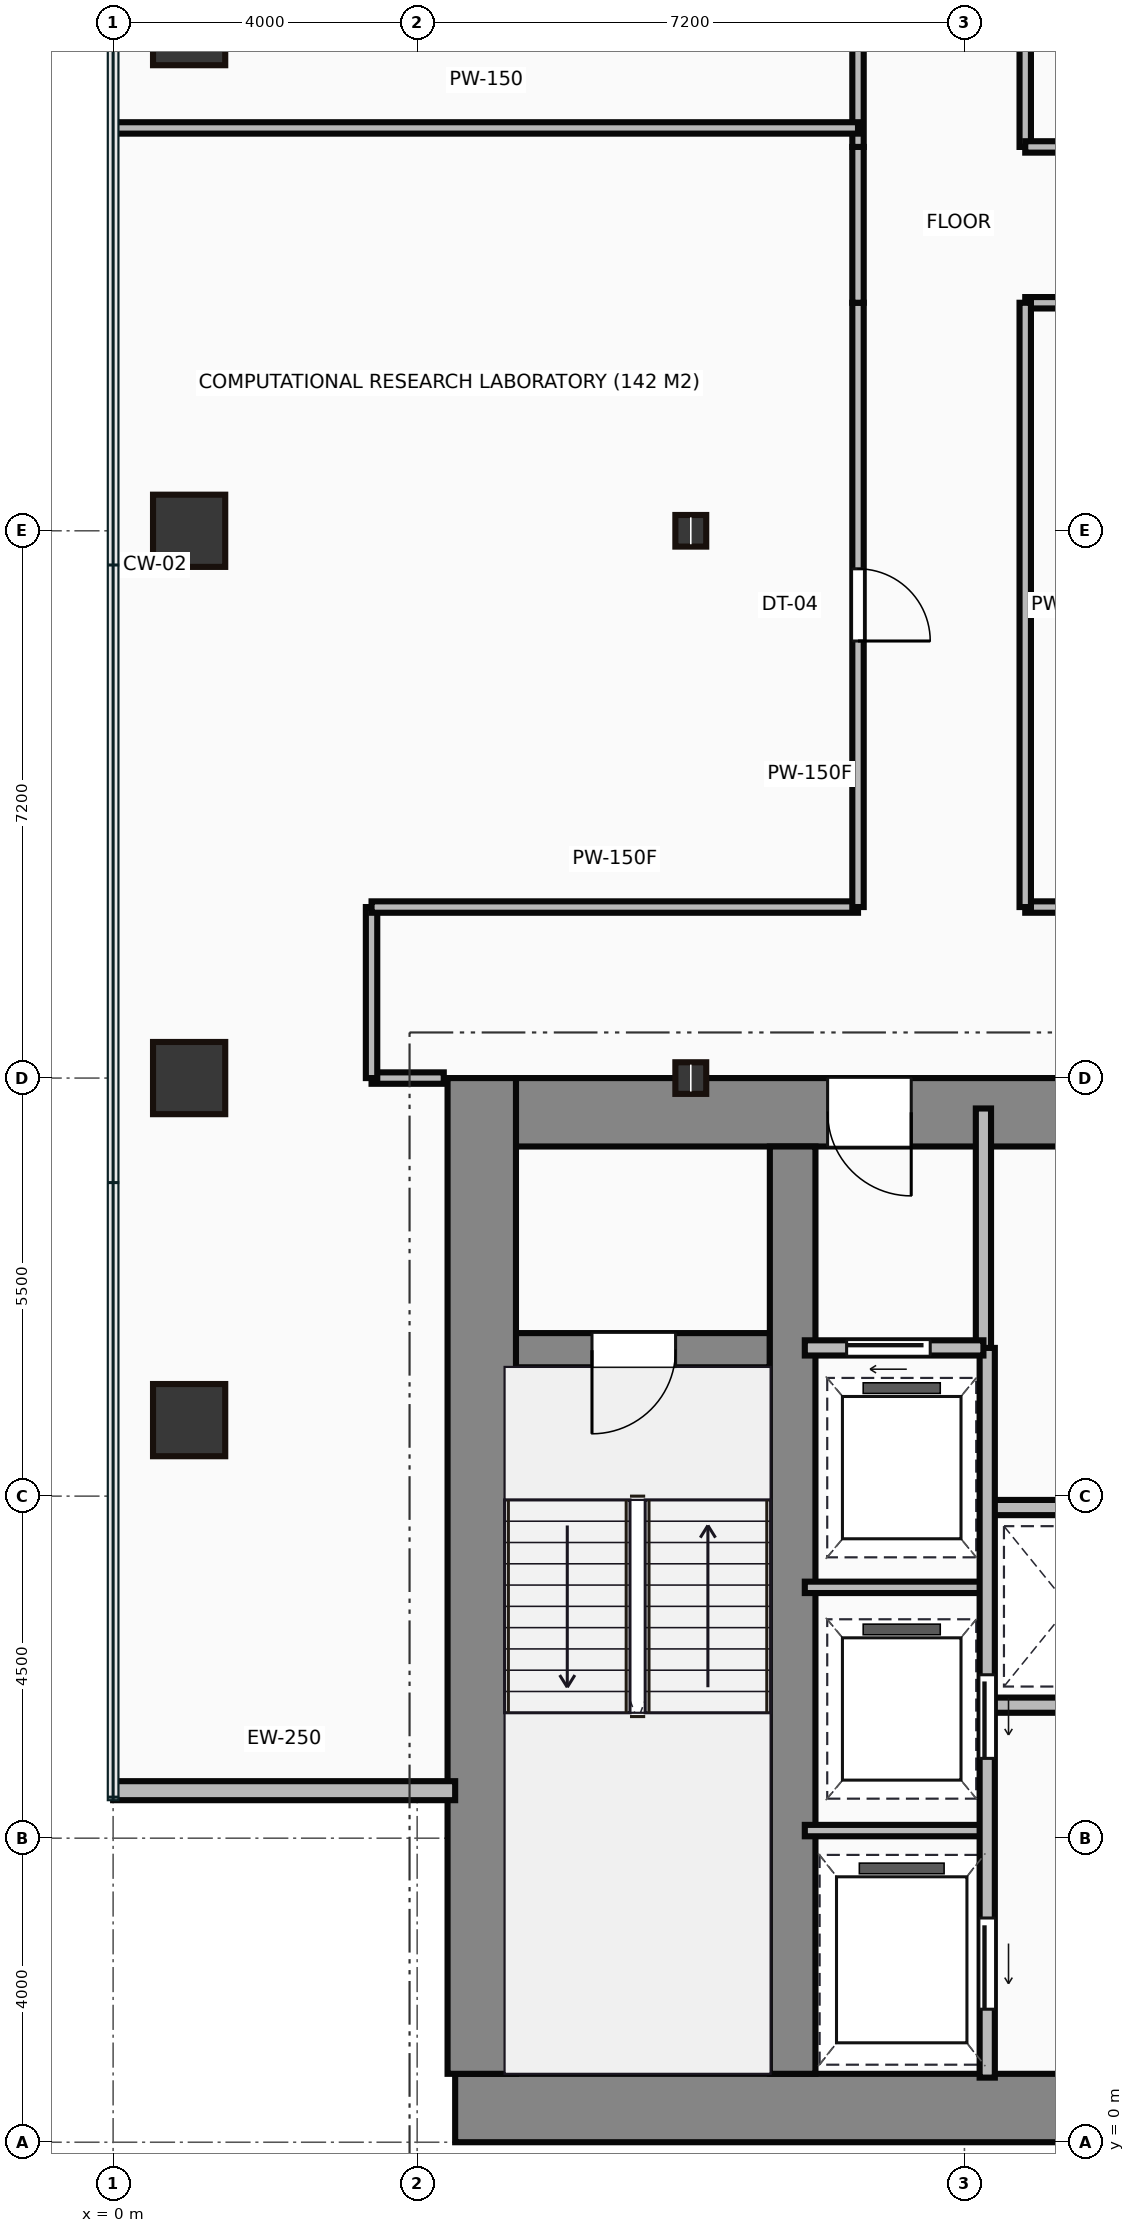
"""IFC4 building model, lengths in metres.
Left out: names, types, materials, properties, quantities, classifications, styles, units other than length and angle.
Written with IfcOpenShell. Run it as: python <this file> out.ifc"""

import sys

from ifc_helpers import new_model, si_unit, direction, frame, frame_2d, origin, origin_2d, place, context, subcontext, project, spatial, rectangle, hollow_rectangle, i_section, extrude, source, transform, mapped, element, fill, save


model = new_model("IFC4")
c1 = context("Model", 3, precision=1e-05, world=origin(), true_north=direction((0.0, 1.0)))
c2 = subcontext(c1, "Body", "Model", "MODEL_VIEW")
j1 = project(units=[si_unit("LENGTHUNIT", "METRE"), si_unit("PLANEANGLEUNIT", "RADIAN")], contexts=[c1])
p1 = place(None, origin())
s1 = spatial("IfcSite", under=j1, at=p1, CompositionType="ELEMENT")
p2 = place(p1, origin())
s2 = spatial("IfcBuilding", under=s1, at=p2, CompositionType="ELEMENT")
p3 = place(p2, frame((0.0, 0.0, 43.45)))
s3 = spatial("IfcBuildingStorey", under=s2, at=p3, CompositionType="ELEMENT", Elevation=43.45)
m1 = source(origin(), c2, "Body", "SweptSolid", [
    extrude(rectangle(XDim=29.5, YDim=0.9, at=frame_2d((14.75, 0.0))), origin(), (0.0, 0.0, 1.0), 3.65),
])
p4 = place(p3, frame((4.5, 0.45, 0.0), z_axis=(0.0, 0.0, 1.0), x_axis=(1.0, 0.0, 0.0)))
e1 = element("IfcWall", 1, at=p4, inside=s3, PredefinedType="SHEAR", context=c2, shape_type="MappedRepresentation", body=[
    mapped(m1, transform((0.0, 0.0, 0.0))),
])
m2 = source(origin(), c2, "Body", "SweptSolid", [
    extrude(rectangle(XDim=13.1, YDim=0.9, at=frame_2d((6.55, 0.0))), origin(), (0.0, 0.0, 1.0), 3.65),
])
p5 = place(p3, frame((4.85, 0.9, 0.0), z_axis=(0.0, 0.0, 1.0), x_axis=(0.0, 1.0, 0.0)))
e2 = element("IfcWall", 2, at=p5, inside=s3, PredefinedType="SHEAR", context=c2, shape_type="MappedRepresentation", body=[
    mapped(m2, transform((0.0, 0.0, 0.0))),
])
m3 = source(origin(), c2, "Body", "SweptSolid", [
    extrude(rectangle(XDim=9.1, YDim=0.9, at=frame_2d((4.55, 0.0))), origin(), (0.0, 0.0, 1.0), 3.65),
])
p6 = place(p3, frame((5.3, 13.55, 0.0), z_axis=(0.0, 0.0, 1.0), x_axis=(1.0, 0.0, 0.0)))
e3 = element("IfcWall", 3, at=p6, inside=s3, PredefinedType="SHEAR", context=c2, shape_type="MappedRepresentation", body=[
    mapped(m3, transform((0.0, 0.0, 0.0))),
])
p7 = place(p6, frame((4.1, 0.0, 0.0)))
e4 = element("IfcOpeningElement", 4, at=p7, cuts=e3, PredefinedType="OPENING", context=c2, shape_type="SweptSolid", body=[
    extrude(rectangle(XDim=1.1, YDim=2.15, at=frame_2d((0.55, 1.075))), frame((0.0, 0.46, 0.0), z_axis=(0.0, -1.0, 0.0), x_axis=(1.0, 0.0, 0.0)), (0.0, 0.0, 1.0), 0.92),
])
m4 = source(origin(), c2, "Body", "SweptSolid", [
    extrude(rectangle(XDim=12.2, YDim=0.6, at=frame_2d((6.1, 0.0))), origin(), (0.0, 0.0, 1.0), 3.65),
])
p8 = place(p3, frame((8.94, 0.9, 0.0), z_axis=(0.0, 0.0, 1.0), x_axis=(0.0, 1.0, 0.0)))
e5 = element("IfcWall", 5, at=p8, inside=s3, PredefinedType="SHEAR", context=c2, shape_type="MappedRepresentation", body=[
    mapped(m4, transform((0.0, 0.0, 0.0))),
])
m5 = source(origin(), c2, "Body", "SweptSolid", [
    extrude(rectangle(XDim=3.39, YDim=0.45, at=frame_2d((1.695, 0.0))), origin(), (0.0, 0.0, 1.0), 3.65),
])
p9 = place(p3, frame((5.25, 10.42, 0.0), z_axis=(0.0, 0.0, 1.0), x_axis=(1.0, 0.0, 0.0)))
e6 = element("IfcWall", 6, at=p9, inside=s3, PredefinedType="SHEAR", context=c2, shape_type="MappedRepresentation", body=[
    mapped(m5, transform((0.0, 0.0, 0.0))),
])
p10 = place(p9, frame((1.05, 0.0, 0.0)))
e7 = element("IfcOpeningElement", 7, at=p10, cuts=e6, PredefinedType="OPENING", context=c2, shape_type="SweptSolid", body=[
    extrude(rectangle(XDim=1.1, YDim=2.15, at=frame_2d((0.55, 1.075))), frame((0.0, 0.235, 0.0), z_axis=(0.0, -1.0, 0.0), x_axis=(1.0, 0.0, 0.0)), (0.0, 0.0, 1.0), 0.47),
])
m6 = source(origin(), c2, "Body", "SweptSolid", [
    extrude(hollow_rectangle(XDim=0.95, YDim=0.95, WallThickness=0.045, at=origin_2d()), origin(), (0.0, 0.0, 1.0), 3.65),
])
for number, where, z_axis, x_axis in (
    (8, (1.0, 9.5, 0.0), (0.0, 0.0, 1.0), (1.0, 0.0, 0.0)),
    (9, (1.0, 14.0, 0.0), (0.0, 0.0, 1.0), (1.0, 0.0, 0.0)),
    (10, (1.0, 21.2, 0.0), (0.0, 0.0, 1.0), (1.0, 0.0, 0.0)),
    (11, (1.0, 27.8, 0.0), (0.0, 0.0, 1.0), (1.0, 0.0, 0.0)),
):
    element("IfcColumn", number, at=place(p3, frame(where, z_axis=z_axis, x_axis=x_axis)), inside=s3, PredefinedType="COLUMN", context=c2, shape_type="MappedRepresentation", body=[
        mapped(m6, transform((0.0, 0.0, 0.0))),
    ])
m7 = source(origin(), c2, "Body", "SweptSolid", [
    extrude(i_section(OverallWidth=0.406, OverallDepth=0.416, WebThickness=0.03, FlangeThickness=0.048, at=origin_2d()), origin(), (0.0, 0.0, 1.0), 3.65),
])
for number, where, z_axis, x_axis in (
    (12, (7.6, 14.0, 0.0), (0.0, 0.0, 1.0), (1.0, 0.0, 0.0)),
    (13, (7.6, 21.2, 0.0), (0.0, 0.0, 1.0), (1.0, 0.0, 0.0)),
):
    element("IfcColumn", number, at=place(p3, frame(where, z_axis=z_axis, x_axis=x_axis)), inside=s3, PredefinedType="COLUMN", context=c2, shape_type="MappedRepresentation", body=[
        mapped(m7, transform((0.0, 0.0, 0.0))),
    ])
m8 = source(origin(), c2, "Body", "SweptSolid", [
    extrude(rectangle(XDim=4.5, YDim=0.25, at=frame_2d((2.25, 0.0))), origin(), (0.0, 0.0, 1.0), 3.4),
])
p11 = place(p3, frame((0.0, 4.625, 0.0), z_axis=(0.0, 0.0, 1.0), x_axis=(1.0, 0.0, 0.0)))
e14 = element("IfcWall", 14, at=p11, inside=s3, PredefinedType="STANDARD", context=c2, shape_type="MappedRepresentation", body=[
    mapped(m8, transform((0.0, 0.0, 0.0))),
])
m9 = source(origin(), c2, "Body", "SweptSolid", [
    extrude(rectangle(XDim=3.18, YDim=0.2, at=frame_2d((1.59, 0.0))), origin(), (0.0, 0.0, 1.0), 3.4),
])
p12 = place(p3, frame((11.45, 10.42, 0.0), z_axis=(0.0, 0.0, 1.0), x_axis=(0.0, 1.0, 0.0)))
e15 = element("IfcWall", 15, at=p12, inside=s3, PredefinedType="PARTITIONING", context=c2, shape_type="MappedRepresentation", body=[
    mapped(m9, transform((0.0, 0.0, 0.0))),
])
m10 = source(origin(), c2, "Body", "SweptSolid", [
    extrude(rectangle(XDim=2.35, YDim=0.2, at=frame_2d((1.175, 0.0))), origin(), (0.0, 0.0, 1.0), 3.4),
])
p13 = place(p3, frame((9.1, 10.45, 0.0), z_axis=(0.0, 0.0, 1.0), x_axis=(1.0, 0.0, 0.0)))
e16 = element("IfcWall", 16, at=p13, inside=s3, PredefinedType="PARTITIONING", context=c2, shape_type="MappedRepresentation", body=[
    mapped(m10, transform((0.0, 0.0, 0.0))),
])
p14 = place(p13, frame((0.55, 0.0, 0.0)))
e17 = element("IfcOpeningElement", 17, at=p14, cuts=e16, PredefinedType="OPENING", context=c2, shape_type="SweptSolid", body=[
    extrude(rectangle(XDim=1.1, YDim=2.15, at=frame_2d((0.55, 1.075))), frame((0.0, 0.11, 0.0), z_axis=(0.0, -1.0, 0.0), x_axis=(1.0, 0.0, 0.0)), (0.0, 0.0, 1.0), 0.22),
])
m11 = source(origin(), c2, "Body", "SweptSolid", [
    extrude(rectangle(XDim=9.6, YDim=0.2, at=frame_2d((4.8, 0.0))), origin(), (0.0, 0.0, 1.0), 3.4),
])
p15 = place(p3, frame((11.5, 0.85, 0.0), z_axis=(0.0, 0.0, 1.0), x_axis=(0.0, 1.0, 0.0)))
e18 = element("IfcWall", 18, at=p15, inside=s3, PredefinedType="PARTITIONING", context=c2, shape_type="MappedRepresentation", body=[
    mapped(m11, transform((0.0, 0.0, 0.0))),
])
p16 = place(p15, frame((4.2, 0.0, 0.0)))
e19 = element("IfcOpeningElement", 19, at=p16, cuts=e18, PredefinedType="OPENING", context=c2, shape_type="SweptSolid", body=[
    extrude(rectangle(XDim=1.1, YDim=2.15, at=frame_2d((0.55, 1.075))), frame((0.0, 0.11, 0.0), z_axis=(0.0, -1.0, 0.0), x_axis=(1.0, 0.0, 0.0)), (0.0, 0.0, 1.0), 0.22),
])
p17 = place(p15, frame((0.9, 0.0, 0.0)))
e20 = element("IfcOpeningElement", 20, at=p17, cuts=e18, PredefinedType="OPENING", context=c2, shape_type="SweptSolid", body=[
    extrude(rectangle(XDim=1.2, YDim=2.15, at=frame_2d((0.6, 1.075))), frame((0.0, 0.11, 0.0), z_axis=(0.0, -1.0, 0.0), x_axis=(1.0, 0.0, 0.0)), (0.0, 0.0, 1.0), 0.22),
])
m12 = source(origin(), c2, "Body", "SweptSolid", [
    extrude(rectangle(XDim=2.4, YDim=0.15, at=frame_2d((1.2, 0.0))), origin(), (0.0, 0.0, 1.0), 3.4),
])
for number, where, z_axis, x_axis in (
    (21, (9.1, 4.1, 0.0), (0.0, 0.0, 1.0), (1.0, 0.0, 0.0)),
    (22, (9.1, 7.3, 0.0), (0.0, 0.0, 1.0), (1.0, 0.0, 0.0)),
):
    element("IfcWall", number, at=place(p3, frame(where, z_axis=z_axis, x_axis=x_axis)), inside=s3, PredefinedType="PARTITIONING", context=c2, shape_type="MappedRepresentation", body=[
        mapped(m12, transform((0.0, 0.0, 0.0))),
    ])
m13 = source(origin(), c2, "Body", "SweptSolid", [
    extrude(rectangle(XDim=11.85, YDim=0.2, at=frame_2d((5.925, 0.0))), origin(), (0.0, 0.0, 1.0), 3.4),
])
for number, where, z_axis, x_axis in (
    (23, (11.55, 5.75, 0.0), (0.0, 0.0, 1.0), (1.0, 0.0, 0.0)),
    (24, (11.55, 8.35, 0.0), (0.0, 0.0, 1.0), (1.0, 0.0, 0.0)),
):
    element("IfcWall", number, at=place(p3, frame(where, z_axis=z_axis, x_axis=x_axis)), inside=s3, PredefinedType="PARTITIONING", context=c2, shape_type="MappedRepresentation", body=[
        mapped(m13, transform((0.0, 0.0, 0.0))),
    ])
m14 = source(origin(), c2, "Body", "SweptSolid", [
    extrude(rectangle(XDim=0.95, YDim=0.15, at=frame_2d((0.475, 0.0))), origin(), (0.0, 0.0, 1.0), 2.625),
])
p18 = place(p3, frame((4.35, 14.0, 0.0), z_axis=(0.0, 0.0, 1.0), x_axis=(-1.0, 0.0, 0.0)))
e25 = element("IfcWall", 25, at=p18, inside=s3, PredefinedType="PARTITIONING", context=c2, shape_type="MappedRepresentation", body=[
    mapped(m14, transform((0.0, 0.0, 0.0))),
])
m15 = source(origin(), c2, "Body", "SweptSolid", [
    extrude(rectangle(XDim=2.25, YDim=0.15, at=frame_2d((1.125, 0.0))), origin(), (0.0, 0.0, 1.0), 3.4),
])
p19 = place(p3, frame((3.4, 14.0, 0.0), z_axis=(0.0, 0.0, 1.0), x_axis=(0.0, 1.0, 0.0)))
e26 = element("IfcWall", 26, at=p19, inside=s3, PredefinedType="PARTITIONING", context=c2, shape_type="MappedRepresentation", body=[
    mapped(m15, transform((0.0, 0.0, 0.0))),
])
m16 = source(origin(), c2, "Body", "SweptSolid", [
    extrude(rectangle(XDim=6.4, YDim=0.15, at=frame_2d((3.2, 0.0))), origin(), (0.0, 0.0, 1.0), 3.4),
])
p20 = place(p3, frame((3.4, 16.25, 0.0), z_axis=(0.0, 0.0, 1.0), x_axis=(1.0, 0.0, 0.0)))
e27 = element("IfcWall", 27, at=p20, inside=s3, PredefinedType="PARTITIONING", context=c2, shape_type="MappedRepresentation", body=[
    mapped(m16, transform((0.0, 0.0, 0.0))),
])
m17 = source(origin(), c2, "Body", "SweptSolid", [
    extrude(rectangle(XDim=7.95, YDim=0.15, at=frame_2d((3.975, 0.0))), origin(), (0.0, 0.0, 1.0), 3.4),
])
p21 = place(p3, frame((9.8, 16.25, 0.0), z_axis=(0.0, 0.0, 1.0), x_axis=(0.0, 1.0, 0.0)))
e28 = element("IfcWall", 28, at=p21, inside=s3, PredefinedType="PARTITIONING", context=c2, shape_type="MappedRepresentation", body=[
    mapped(m17, transform((0.0, 0.0, 0.0))),
])
p22 = place(p21, frame((3.5, 0.0, 0.0)))
e29 = element("IfcOpeningElement", 29, at=p22, cuts=e28, PredefinedType="OPENING", context=c2, shape_type="SweptSolid", body=[
    extrude(rectangle(XDim=0.95, YDim=2.15, at=frame_2d((0.475, 1.075))), frame((0.0, 0.085, 0.0), z_axis=(0.0, -1.0, 0.0), x_axis=(1.0, 0.0, 0.0)), (0.0, 0.0, 1.0), 0.17),
])
m18 = source(origin(), c2, "Body", "SweptSolid", [
    extrude(rectangle(XDim=2.05, YDim=0.15, at=frame_2d((1.025, 0.0))), origin(), (0.0, 0.0, 1.0), 3.4),
])
p23 = place(p3, frame((9.8, 24.2, 0.0), z_axis=(0.0, 0.0, 1.0), x_axis=(0.0, 1.0, 0.0)))
e30 = element("IfcWall", 30, at=p23, inside=s3, PredefinedType="PARTITIONING", context=c2, shape_type="MappedRepresentation", body=[
    mapped(m18, transform((0.0, 0.0, 0.0))),
])
m19 = source(origin(), c2, "Body", "SweptSolid", [
    extrude(rectangle(XDim=9.75, YDim=0.15, at=frame_2d((4.875, 0.0))), origin(), (0.0, 0.0, 1.0), 3.4),
])
p24 = place(p3, frame((9.8, 26.25, 0.0), z_axis=(0.0, 0.0, 1.0), x_axis=(0.0, 1.0, 0.0)))
e31 = element("IfcWall", 31, at=p24, inside=s3, PredefinedType="PARTITIONING", context=c2, shape_type="MappedRepresentation", body=[
    mapped(m19, transform((0.0, 0.0, 0.0))),
])
p25 = place(p24, frame((4.4, 0.0, 0.0)))
e32 = element("IfcOpeningElement", 32, at=p25, cuts=e31, PredefinedType="OPENING", context=c2, shape_type="SweptSolid", body=[
    extrude(rectangle(XDim=0.95, YDim=2.15, at=frame_2d((0.475, 1.075))), frame((0.0, 0.085, 0.0), z_axis=(0.0, -1.0, 0.0), x_axis=(1.0, 0.0, 0.0)), (0.0, 0.0, 1.0), 0.17),
])
p26 = place(p3, frame((12.0, 36.0, 0.0), z_axis=(0.0, 0.0, 1.0), x_axis=(0.0, -1.0, 0.0)))
e33 = element("IfcWall", 33, at=p26, inside=s3, PredefinedType="PARTITIONING", context=c2, shape_type="MappedRepresentation", body=[
    mapped(m19, transform((0.0, 0.0, 0.0))),
])
m20 = source(origin(), c2, "Body", "SweptSolid", [
    extrude(rectangle(XDim=18.4, YDim=0.15, at=frame_2d((9.2, 0.0))), origin(), (0.0, 0.0, 1.0), 3.4),
])
p27 = place(p3, frame((12.0, 26.25, 0.0), z_axis=(0.0, 0.0, 1.0), x_axis=(1.0, 0.0, 0.0)))
e34 = element("IfcWall", 34, at=p27, inside=s3, PredefinedType="PARTITIONING", context=c2, shape_type="MappedRepresentation", body=[
    mapped(m20, transform((0.0, 0.0, 0.0))),
])
p28 = place(p27, frame((10.595, 0.0, 0.0)))
e35 = element("IfcOpeningElement", 35, at=p28, cuts=e34, PredefinedType="OPENING", context=c2, shape_type="SweptSolid", body=[
    extrude(rectangle(XDim=0.95, YDim=2.15, at=frame_2d((0.475, 1.075))), frame((0.0, 0.085, 0.0), z_axis=(0.0, -1.0, 0.0), x_axis=(1.0, 0.0, 0.0)), (0.0, 0.0, 1.0), 0.17),
])
p29 = place(p3, frame((12.0, 16.25, 0.0), z_axis=(0.0, 0.0, 1.0), x_axis=(1.0, 0.0, 0.0)))
e36 = element("IfcWall", 36, at=p29, inside=s3, PredefinedType="PARTITIONING", context=c2, shape_type="MappedRepresentation", body=[
    mapped(m20, transform((0.0, 0.0, 0.0))),
])
p30 = place(p29, frame((8.725, 0.0, 0.0)))
e37 = element("IfcOpeningElement", 37, at=p30, cuts=e36, PredefinedType="OPENING", context=c2, shape_type="SweptSolid", body=[
    extrude(rectangle(XDim=0.95, YDim=2.15, at=frame_2d((0.475, 1.075))), frame((0.0, 0.085, 0.0), z_axis=(0.0, -1.0, 0.0), x_axis=(1.0, 0.0, 0.0)), (0.0, 0.0, 1.0), 0.17),
])
p31 = place(p3, frame((30.4, 24.2, 0.0), z_axis=(0.0, 0.0, 1.0), x_axis=(-1.0, 0.0, 0.0)))
e38 = element("IfcWall", 38, at=p31, inside=s3, PredefinedType="PARTITIONING", context=c2, shape_type="MappedRepresentation", body=[
    mapped(m20, transform((0.0, 0.0, 0.0))),
])
p32 = place(p3, frame((12.0, 24.2, 0.0), z_axis=(0.0, 0.0, 1.0), x_axis=(0.0, -1.0, 0.0)))
e39 = element("IfcWall", 39, at=p32, inside=s3, PredefinedType="PARTITIONING", context=c2, shape_type="MappedRepresentation", body=[
    mapped(m17, transform((0.0, 0.0, 0.0))),
])
m21 = source(origin(), c2, "Body", "SweptSolid", [
    extrude(rectangle(XDim=9.78, YDim=0.15, at=frame_2d((4.89, 0.0))), origin(), (0.0, 0.0, 1.0), 3.4),
])
p33 = place(p3, frame((0.02, 26.5, 0.0), z_axis=(0.0, 0.0, 1.0), x_axis=(1.0, 0.0, 0.0)))
e40 = element("IfcWall", 40, at=p33, inside=s3, PredefinedType="PARTITIONING", context=c2, shape_type="MappedRepresentation", body=[
    mapped(m21, transform((0.0, 0.0, 0.0))),
])
m22 = source(origin(), c2, "Body", "SweptSolid", [
    extrude(rectangle(XDim=1.1, YDim=2.15, at=frame_2d((0.55, 1.075))), frame((0.0, 0.025, 0.0), z_axis=(0.0, -1.0, 0.0), x_axis=(1.0, 0.0, 0.0)), (0.0, 0.0, 1.0), 0.05),
])
p34 = place(p10, frame((1.1, 0.0, 0.0), z_axis=(0.0, 0.0, 1.0), x_axis=(-1.0, 0.0, 0.0)))
e41 = element("IfcDoor", 41, at=p34, inside=s3, OperationType="SINGLE_SWING_LEFT", PredefinedType="DOOR", context=c2, shape_type="MappedRepresentation", body=[
    mapped(m22, transform((0.0, 0.0, 0.0))),
])
fill(e7, e41)
p35 = place(p7, origin())
e42 = element("IfcDoor", 42, at=p35, inside=s3, OperationType="SINGLE_SWING_RIGHT", PredefinedType="DOOR", context=c2, shape_type="MappedRepresentation", body=[
    mapped(m22, transform((0.0, 0.0, 0.0))),
])
fill(e4, e42)
p36 = place(p14, origin())
e43 = element("IfcDoor", 43, at=p36, inside=s3, OperationType="SLIDING_TO_LEFT", PredefinedType="DOOR", context=c2, shape_type="MappedRepresentation", body=[
    mapped(m22, transform((0.0, 0.0, 0.0))),
])
fill(e17, e43)
p37 = place(p16, frame((1.1, 0.0, 0.0), z_axis=(0.0, 0.0, 1.0), x_axis=(-1.0, 0.0, 0.0)))
e44 = element("IfcDoor", 44, at=p37, inside=s3, OperationType="SLIDING_TO_LEFT", PredefinedType="DOOR", context=c2, shape_type="MappedRepresentation", body=[
    mapped(m22, transform((0.0, 0.0, 0.0))),
])
fill(e19, e44)
m23 = source(origin(), c2, "Body", "SweptSolid", [
    extrude(rectangle(XDim=1.2, YDim=2.15, at=frame_2d((0.6, 1.075))), frame((0.0, 0.025, 0.0), z_axis=(0.0, -1.0, 0.0), x_axis=(1.0, 0.0, 0.0)), (0.0, 0.0, 1.0), 0.05),
])
p38 = place(p17, frame((1.2, 0.0, 0.0), z_axis=(0.0, 0.0, 1.0), x_axis=(-1.0, 0.0, 0.0)))
e45 = element("IfcDoor", 45, at=p38, inside=s3, OperationType="SLIDING_TO_LEFT", PredefinedType="DOOR", context=c2, shape_type="MappedRepresentation", body=[
    mapped(m23, transform((0.0, 0.0, 0.0))),
])
fill(e20, e45)
m24 = source(origin(), c2, "Body", "SweptSolid", [
    extrude(rectangle(XDim=0.95, YDim=2.15, at=frame_2d((0.475, 1.075))), frame((0.0, 0.025, 0.0), z_axis=(0.0, -1.0, 0.0), x_axis=(1.0, 0.0, 0.0)), (0.0, 0.0, 1.0), 0.05),
])
p39 = place(p22, origin())
e46 = element("IfcDoor", 46, at=p39, inside=s3, OperationType="SINGLE_SWING_LEFT", PredefinedType="DOOR", context=c2, shape_type="MappedRepresentation", body=[
    mapped(m24, transform((0.0, 0.0, 0.0))),
])
fill(e29, e46)
save(model, sys.argv[1])
